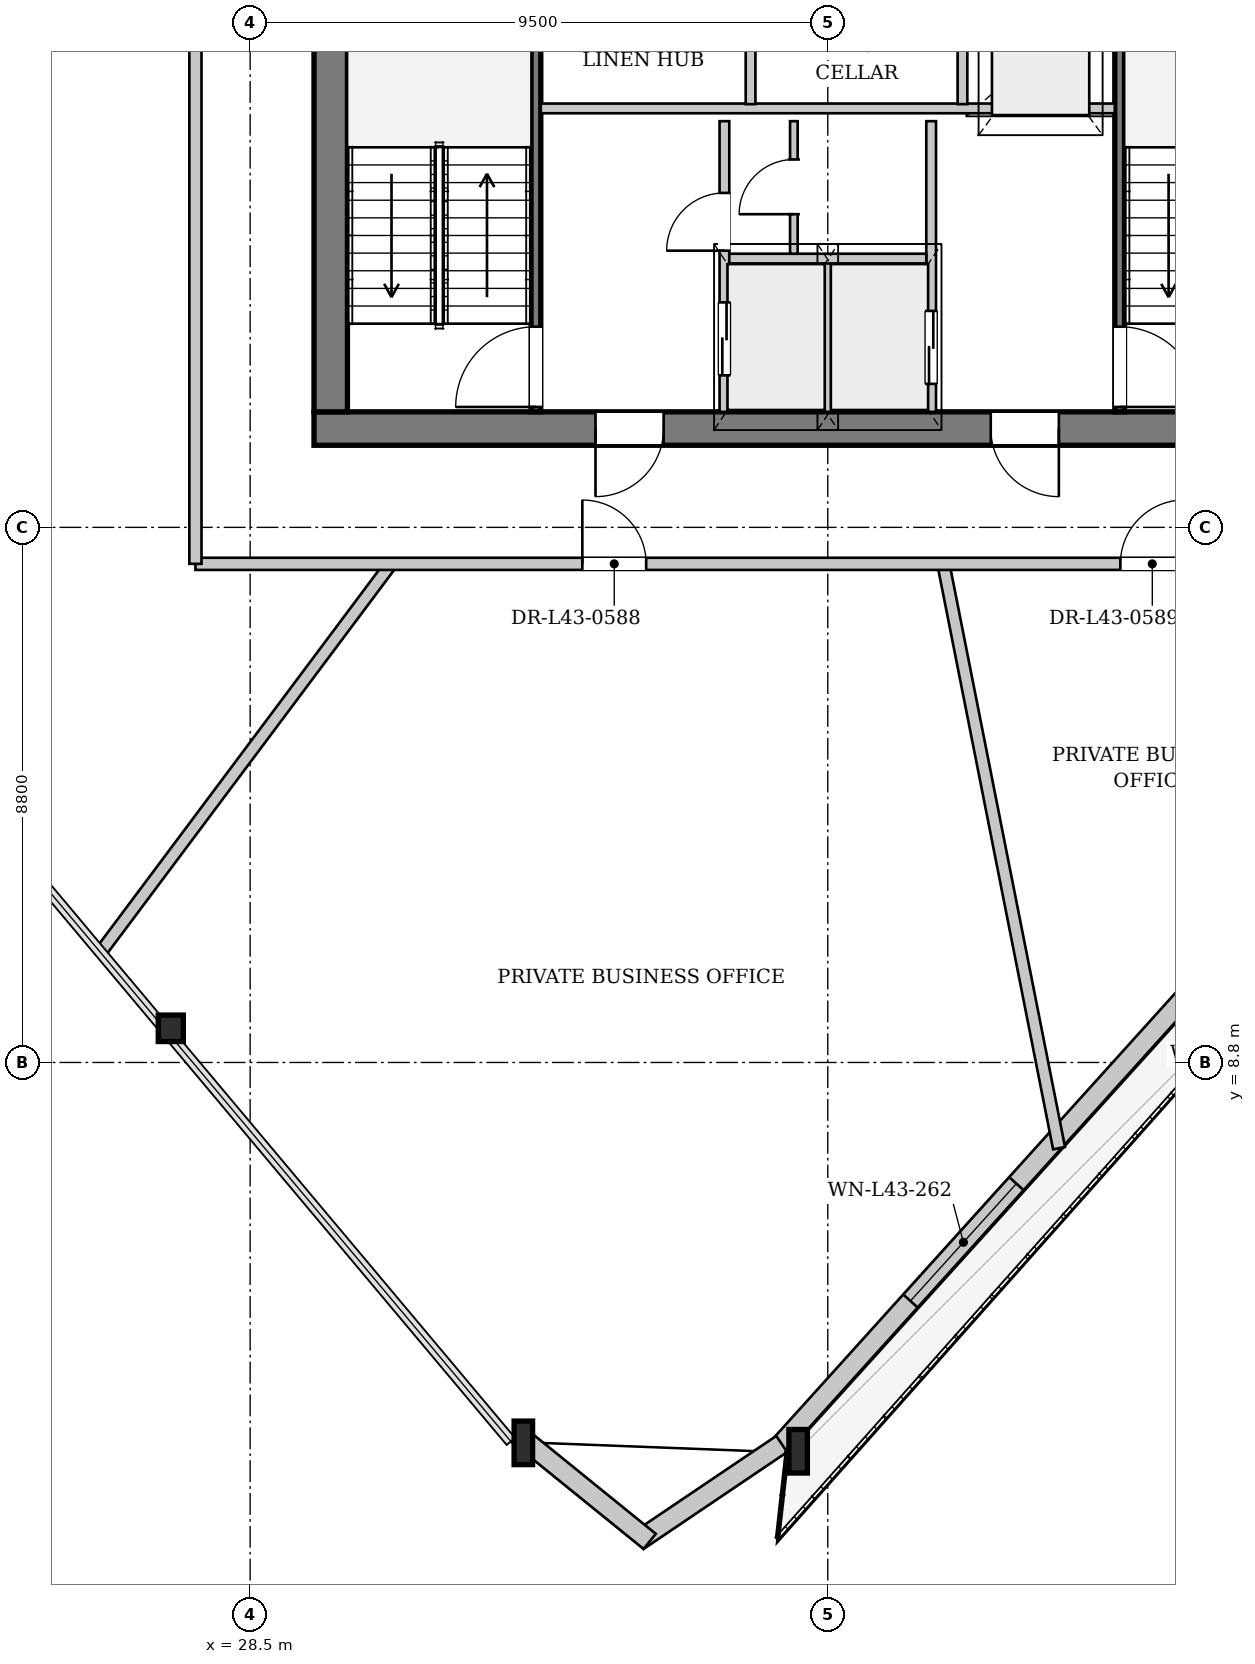
"""IFC4 building model, lengths in metres.
Left out: names, types, materials, properties, quantities, classifications, styles, units other than length and angle.
Written with IfcOpenShell. Run it as: python <this file> out.ifc"""

import sys

from ifc_helpers import new_model, si_unit, direction, frame, frame_2d, origin, origin_2d, place, context, subcontext, project, spatial, rectangle, i_section, extrude, source, transform, mapped, element, fill, save


model = new_model("IFC4")
c1 = context("Model", 3, precision=1e-05, world=origin(), true_north=direction((0.0, 1.0)))
c2 = subcontext(c1, "Body", "Model", "MODEL_VIEW")
j1 = project(units=[si_unit("LENGTHUNIT", "METRE"), si_unit("PLANEANGLEUNIT", "RADIAN")], contexts=[c1])
p1 = place(None, origin())
s1 = spatial("IfcSite", under=j1, at=p1, CompositionType="ELEMENT")
p2 = place(p1, origin())
s2 = spatial("IfcBuilding", under=s1, at=p2, CompositionType="ELEMENT")
p3 = place(p2, frame((0.0, 0.0, 164.35)))
s3 = spatial("IfcBuildingStorey", under=s2, at=p3, CompositionType="ELEMENT", Elevation=164.35)
m1 = source(origin(), c2, "Body", "SweptSolid", [
    extrude(i_section(OverallWidth=0.412, OverallDepth=0.435, WebThickness=0.031, FlangeThickness=0.05, at=origin_2d()), origin(), (0.0, 0.0, 1.0), 3.403),
])
p4 = place(p3, frame((27.031, 9.427, 0.0), z_axis=(0.096057636835, -0.037949581692, 0.994652079702), x_axis=(0.367435364089, 0.930049059575, 0.0)))
e1 = element("IfcColumn", 1, at=p4, inside=s3, PredefinedType="COLUMN", context=c2, shape_type="MappedRepresentation", body=[
    mapped(m1, transform((0.0, 0.0, 0.0), x_axis=(1.0, 0.0, 0.0), y_axis=(0.0, 1.0, 0.0), z_axis=(0.0, 0.0, 1.0), scale=1.0)),
])
m2 = source(origin(), c2, "Body", "SweptSolid", [
    extrude(i_section(OverallWidth=0.304, OverallDepth=0.716, WebThickness=0.021, FlangeThickness=0.04, at=origin_2d()), origin(), (0.0, 0.0, 1.0), 3.41),
])
p5 = place(p3, frame((32.788, 2.568, 0.0), z_axis=(0.12020691326, -0.013602926456, 0.99265565953), x_axis=(0.112444915046, 0.993657959803, 0.0)))
e2 = element("IfcColumn", 2, at=p5, inside=s3, PredefinedType="COLUMN", context=c2, shape_type="MappedRepresentation", body=[
    mapped(m2, transform((0.0, 0.0, 0.0), x_axis=(1.0, 0.0, 0.0), y_axis=(0.0, 1.0, 0.0), z_axis=(0.0, 0.0, 1.0), scale=1.0)),
])
m3 = source(origin(), c2, "Body", "SweptSolid", [
    extrude(i_section(OverallWidth=0.304, OverallDepth=0.716, WebThickness=0.021, FlangeThickness=0.04, at=origin_2d()), origin(), (0.0, 0.0, 1.0), 3.404),
])
p6 = place(p3, frame((37.332, 2.393, 0.0), z_axis=(0.105924766098, 0.007673628959, 0.994344537545), x_axis=(-0.07225478952, 0.997386206738, 0.0)))
e3 = element("IfcColumn", 3, at=p6, inside=s3, PredefinedType="COLUMN", context=c2, shape_type="MappedRepresentation", body=[
    mapped(m3, transform((0.0, 0.0, 0.0), x_axis=(1.0, 0.0, 0.0), y_axis=(0.0, 1.0, 0.0), z_axis=(0.0, 0.0, 1.0), scale=1.0)),
])
p7 = place(p3, frame((52.943, 19.922, 0.0), z_axis=(0.0, 0.0, 1.0), x_axis=(-0.670163184214, -0.742213787614, 0.0)))
e4 = element("IfcWall", 4, at=p7, inside=s3, PredefinedType="SOLIDWALL", context=c2, shape_type="SweptSolid", body=[
    extrude(rectangle(XDim=23.472, YDim=0.32, at=frame_2d((11.736, 0.0))), origin(), (0.0, 0.0, 1.0), 2.722),
])
p8 = place(p7, frame((6.761, 0.0, 0.0)))
e5 = element("IfcOpeningElement", 5, at=p8, cuts=e4, PredefinedType="OPENING", context=c2, shape_type="SweptSolid", body=[
    extrude(rectangle(XDim=1.5, YDim=2.3, at=frame_2d((0.75, 1.15))), frame((0.0, 0.17, 0.0), z_axis=(0.0, -1.0, 0.0), x_axis=(1.0, 0.0, 0.0)), (0.0, 0.0, 1.0), 0.34),
])
p9 = place(p7, frame((17.669, 0.0, 0.252)))
e6 = element("IfcOpeningElement", 6, at=p9, cuts=e4, PredefinedType="OPENING", context=c2, shape_type="SweptSolid", body=[
    extrude(rectangle(XDim=2.6, YDim=2.35, at=frame_2d((1.3, 1.175))), frame((0.0, 0.17, 0.0), z_axis=(0.0, -1.0, 0.0), x_axis=(1.0, 0.0, 0.0)), (0.0, 0.0, 1.0), 0.34),
])
p10 = place(p3, frame((37.242, 2.526, 0.0), z_axis=(0.0, 0.0, 1.0), x_axis=(-0.829005606427, -0.559240292283, 0.0)))
e7 = element("IfcWall", 7, at=p10, inside=s3, PredefinedType="SOLIDWALL", context=c2, shape_type="SweptSolid", body=[
    extrude(rectangle(XDim=2.849, YDim=0.32, at=frame_2d((1.424, 0.0))), origin(), (0.0, 0.0, 1.0), 2.722),
])
p11 = place(p3, frame((35.071, 0.924, 0.0), z_axis=(0.0, 0.0, 1.0), x_axis=(-0.776943093124, 0.629570830048, 0.0)))
e8 = element("IfcWall", 8, at=p11, inside=s3, PredefinedType="SOLIDWALL", context=c2, shape_type="SweptSolid", body=[
    extrude(rectangle(XDim=2.808, YDim=0.32, at=frame_2d((1.404, 0.0))), origin(), (0.0, 0.0, 1.0), 2.722),
])
p12 = place(p3, frame((46.45, 19.225, 0.0), z_axis=(0.0, 0.0, 1.0), x_axis=(-1.0, 0.0, 0.0)))
e9 = element("IfcWall", 9, at=p12, inside=s3, PredefinedType="SHEAR", context=c2, shape_type="SweptSolid", body=[
    extrude(rectangle(XDim=16.9, YDim=0.55, at=frame_2d((8.45, 0.0))), origin(), (0.0, 0.0, 1.0), 3.33),
])
p13 = place(p12, frame((4.65, 0.0, 0.0)))
e10 = element("IfcOpeningElement", 10, at=p13, cuts=e9, PredefinedType="OPENING", context=c2, shape_type="SweptSolid", body=[
    extrude(rectangle(XDim=1.12, YDim=2.25, at=frame_2d((0.56, 1.125))), frame((0.0, 0.285, 0.0), z_axis=(0.0, -1.0, 0.0), x_axis=(1.0, 0.0, 0.0)), (0.0, 0.0, 1.0), 0.57),
])
p14 = place(p12, frame((11.15, 0.0, 0.0)))
e11 = element("IfcOpeningElement", 11, at=p14, cuts=e9, PredefinedType="OPENING", context=c2, shape_type="SweptSolid", body=[
    extrude(rectangle(XDim=1.12, YDim=2.25, at=frame_2d((0.56, 1.125))), frame((0.0, 0.285, 0.0), z_axis=(0.0, -1.0, 0.0), x_axis=(1.0, 0.0, 0.0)), (0.0, 0.0, 1.0), 0.57),
])
p15 = place(p3, frame((29.825, 19.5, 0.0), z_axis=(0.0, 0.0, 1.0), x_axis=(0.0, 1.0, 0.0)))
e12 = element("IfcWall", 12, at=p15, inside=s3, PredefinedType="SHEAR", context=c2, shape_type="SweptSolid", body=[
    extrude(rectangle(XDim=14.2, YDim=0.55, at=frame_2d((7.1, 0.0))), origin(), (0.0, 0.0, 1.0), 3.33),
])
p16 = place(p15, frame((7.42, 0.0, 0.0)))
e13 = element("IfcOpeningElement", 13, at=p16, cuts=e12, PredefinedType="OPENING", context=c2, shape_type="SweptSolid", body=[
    extrude(rectangle(XDim=1.6, YDim=2.2, at=frame_2d((0.8, 1.1))), frame((0.0, 0.285, 0.0), z_axis=(0.0, -1.0, 0.0), x_axis=(1.0, 0.0, 0.0)), (0.0, 0.0, 1.0), 0.57),
])
p17 = place(p3, frame((33.2, 19.5, 0.0), z_axis=(0.0, 0.0, 1.0), x_axis=(0.0, 1.0, 0.0)))
e14 = element("IfcWall", 14, at=p17, inside=s3, PredefinedType="PARTITIONING", context=c2, shape_type="SweptSolid", body=[
    extrude(rectangle(XDim=7.46, YDim=0.16, at=frame_2d((3.73, 0.0))), origin(), (0.0, 0.0, 1.0), 3.33),
])
p18 = place(p17, frame((0.08, 0.0, 0.0)))
e15 = element("IfcOpeningElement", 15, at=p18, cuts=e14, PredefinedType="OPENING", context=c2, shape_type="SweptSolid", body=[
    extrude(rectangle(XDim=1.32, YDim=2.2, at=frame_2d((0.66, 1.1))), frame((0.0, 0.09, 0.0), z_axis=(0.0, -1.0, 0.0), x_axis=(1.0, 0.0, 0.0)), (0.0, 0.0, 1.0), 0.18),
])
p19 = place(p3, frame((42.8, 26.96, 0.0), z_axis=(0.0, 0.0, 1.0), x_axis=(0.0, -1.0, 0.0)))
e16 = element("IfcWall", 16, at=p19, inside=s3, PredefinedType="PARTITIONING", context=c2, shape_type="SweptSolid", body=[
    extrude(rectangle(XDim=7.46, YDim=0.16, at=frame_2d((3.73, 0.0))), origin(), (0.0, 0.0, 1.0), 3.33),
])
p20 = place(p19, frame((6.06, 0.0, 0.0)))
e17 = element("IfcOpeningElement", 17, at=p20, cuts=e16, PredefinedType="OPENING", context=c2, shape_type="SweptSolid", body=[
    extrude(rectangle(XDim=1.32, YDim=2.2, at=frame_2d((0.66, 1.1))), frame((0.0, 0.09, 0.0), z_axis=(0.0, -1.0, 0.0), x_axis=(1.0, 0.0, 0.0)), (0.0, 0.0, 1.0), 0.18),
])
p21 = place(p3, frame((36.3, 19.5, 0.0), z_axis=(0.0, 0.0, 1.0), x_axis=(0.0, 1.0, 0.0)))
e18 = element("IfcWall", 18, at=p21, inside=s3, PredefinedType="PARTITIONING", context=c2, shape_type="SweptSolid", body=[
    extrude(rectangle(XDim=4.78, YDim=0.16, at=frame_2d((2.39, 0.0))), origin(), (0.0, 0.0, 1.0), 3.33),
])
p22 = place(p21, frame((0.6, 0.0, 0.0)))
e19 = element("IfcOpeningElement", 19, at=p22, cuts=e18, PredefinedType="OPENING", context=c2, shape_type="SweptSolid", body=[
    extrude(rectangle(XDim=1.2, YDim=2.2, at=frame_2d((0.6, 1.1))), frame((0.0, 0.09, 0.0), z_axis=(0.0, -1.0, 0.0), x_axis=(1.0, 0.0, 0.0)), (0.0, 0.0, 1.0), 0.18),
])
p23 = place(p21, frame((2.65, 0.0, 0.0)))
e20 = element("IfcOpeningElement", 20, at=p23, cuts=e18, PredefinedType="OPENING", context=c2, shape_type="SweptSolid", body=[
    extrude(rectangle(XDim=0.95, YDim=2.1, at=frame_2d((0.475, 1.05))), frame((0.0, 0.09, 0.0), z_axis=(0.0, -1.0, 0.0), x_axis=(1.0, 0.0, 0.0)), (0.0, 0.0, 1.0), 0.18),
])
p24 = place(p3, frame((39.7, 24.28, 0.0), z_axis=(0.0, 0.0, 1.0), x_axis=(0.0, -1.0, 0.0)))
e21 = element("IfcWall", 21, at=p24, inside=s3, PredefinedType="PARTITIONING", context=c2, shape_type="SweptSolid", body=[
    extrude(rectangle(XDim=4.78, YDim=0.16, at=frame_2d((2.39, 0.0))), origin(), (0.0, 0.0, 1.0), 3.33),
])
p25 = place(p24, frame((3.12, 0.0, 0.0)))
e22 = element("IfcOpeningElement", 22, at=p25, cuts=e21, PredefinedType="OPENING", context=c2, shape_type="SweptSolid", body=[
    extrude(rectangle(XDim=1.2, YDim=2.2, at=frame_2d((0.6, 1.1))), frame((0.0, 0.09, 0.0), z_axis=(0.0, -1.0, 0.0), x_axis=(1.0, 0.0, 0.0)), (0.0, 0.0, 1.0), 0.18),
])
p26 = place(p3, frame((38.0, 19.5, 0.0), z_axis=(0.0, 0.0, 1.0), x_axis=(0.0, 1.0, 0.0)))
e23 = element("IfcWall", 23, at=p26, inside=s3, PredefinedType="PARTITIONING", context=c2, shape_type="SweptSolid", body=[
    extrude(rectangle(XDim=2.46, YDim=0.125, at=frame_2d((1.23, 0.0))), origin(), (0.0, 0.0, 1.0), 3.33),
])
p27 = place(p3, frame((36.38, 22.02, 0.0), z_axis=(0.0, 0.0, 1.0), x_axis=(1.0, 0.0, 0.0)))
e24 = element("IfcWall", 24, at=p27, inside=s3, PredefinedType="PARTITIONING", context=c2, shape_type="SweptSolid", body=[
    extrude(rectangle(XDim=3.24, YDim=0.16, at=frame_2d((1.62, 0.0))), origin(), (0.0, 0.0, 1.0), 3.33),
])
p28 = place(p3, frame((33.28, 24.49, 0.0), z_axis=(0.0, 0.0, 1.0), x_axis=(1.0, 0.0, 0.0)))
e25 = element("IfcWall", 25, at=p28, inside=s3, PredefinedType="PARTITIONING", context=c2, shape_type="SweptSolid", body=[
    extrude(rectangle(XDim=9.44, YDim=0.16, at=frame_2d((4.72, 0.0))), origin(), (0.0, 0.0, 1.0), 3.33),
])
p29 = place(p3, frame((37.442, 22.1, 0.0), z_axis=(0.0, 0.0, 1.0), x_axis=(0.0, 1.0, 0.0)))
e26 = element("IfcWall", 26, at=p29, inside=s3, PredefinedType="PARTITIONING", context=c2, shape_type="SweptSolid", body=[
    extrude(rectangle(XDim=2.18, YDim=0.125, at=frame_2d((1.09, 0.0))), origin(), (0.0, 0.0, 1.0), 3.33),
])
p30 = place(p29, frame((0.65, 0.0, 0.0)))
e27 = element("IfcOpeningElement", 27, at=p30, cuts=e26, PredefinedType="OPENING", context=c2, shape_type="SweptSolid", body=[
    extrude(rectangle(XDim=0.9, YDim=2.1, at=frame_2d((0.45, 1.05))), frame((0.0, 0.073, 0.0), z_axis=(0.0, -1.0, 0.0), x_axis=(1.0, 0.0, 0.0)), (0.0, 0.0, 1.0), 0.145),
])
for number, where, z_axis, x_axis in (
    (28, (36.73, 24.56, 0.0), (0.0, 0.0, 1.0), (0.0, 1.0, 0.0)),
    (29, (40.215, 24.56, 0.0), (0.0, 0.0, 1.0), (0.0, 1.0, 0.0)),
):
    element("IfcWall", number, at=place(p3, frame(where, z_axis=z_axis, x_axis=x_axis)), inside=s3, PredefinedType="PARTITIONING", context=c2, shape_type="SweptSolid", body=[
        extrude(rectangle(XDim=2.31, YDim=0.16, at=frame_2d((1.155, 0.0))), origin(), (0.0, 0.0, 1.0), 3.33),
    ])
p31 = place(p3, frame((30.818, 17.0, 0.0), z_axis=(0.0, 0.0, 1.0), x_axis=(-0.599036438664, -0.80072176513, 0.0)))
e30 = element("IfcWall", 30, at=p31, inside=s3, PredefinedType="PARTITIONING", context=c2, shape_type="SweptSolid", body=[
    extrude(rectangle(XDim=7.949, YDim=0.2, at=frame_2d((3.975, 0.0))), origin(), (0.0, 0.0, 1.0), 3.33),
])
p32 = place(p3, frame((39.901, 17.0, 0.0), z_axis=(0.0, 0.0, 1.0), x_axis=(0.194222602979, -0.98095748149, 0.0)))
e31 = element("IfcWall", 31, at=p32, inside=s3, PredefinedType="PARTITIONING", context=c2, shape_type="SweptSolid", body=[
    extrude(rectangle(XDim=9.796, YDim=0.2, at=frame_2d((4.898, 0.0))), origin(), (0.0, 0.0, 1.0), 3.33),
])
p33 = place(p3, frame((27.6, 17.0, 0.0), z_axis=(0.0, 0.0, 1.0), x_axis=(1.0, 0.0, 0.0)))
e32 = element("IfcWall", 32, at=p33, inside=s3, PredefinedType="PARTITIONING", context=c2, shape_type="SweptSolid", body=[
    extrude(rectangle(XDim=20.8, YDim=0.2, at=frame_2d((10.4, 0.0))), origin(), (0.0, 0.0, 1.0), 3.33),
])
p34 = place(p33, frame((6.363, 0.0, 0.0)))
e33 = element("IfcOpeningElement", 33, at=p34, cuts=e32, PredefinedType="OPENING", context=c2, shape_type="SweptSolid", body=[
    extrude(rectangle(XDim=1.05, YDim=2.2, at=frame_2d((0.525, 1.1))), frame((0.0, 0.11, 0.0), z_axis=(0.0, -1.0, 0.0), x_axis=(1.0, 0.0, 0.0)), (0.0, 0.0, 1.0), 0.22),
])
p35 = place(p33, frame((15.212, 0.0, 0.0)))
e34 = element("IfcOpeningElement", 34, at=p35, cuts=e32, PredefinedType="OPENING", context=c2, shape_type="SweptSolid", body=[
    extrude(rectangle(XDim=1.05, YDim=2.2, at=frame_2d((0.525, 1.1))), frame((0.0, 0.11, 0.0), z_axis=(0.0, -1.0, 0.0), x_axis=(1.0, 0.0, 0.0)), (0.0, 0.0, 1.0), 0.22),
])
p36 = place(p3, frame((27.6, 17.0, 0.0), z_axis=(0.0, 0.0, 1.0), x_axis=(0.0, 1.0, 0.0)))
e35 = element("IfcWall", 35, at=p36, inside=s3, PredefinedType="PARTITIONING", context=c2, shape_type="SweptSolid", body=[
    extrude(rectangle(XDim=19.2, YDim=0.2, at=frame_2d((9.6, 0.0))), origin(), (0.0, 0.0, 1.0), 3.33),
])
m4 = source(origin(), c2, "Body", "SweptSolid", [
    extrude(rectangle(XDim=2.6, YDim=2.35, at=frame_2d((1.3, 1.175))), frame((0.0, 0.03, 0.0), z_axis=(0.0, -1.0, 0.0), x_axis=(1.0, 0.0, 0.0)), (0.0, 0.0, 1.0), 0.06),
])
p37 = place(p9, origin())
e36 = element("IfcWindow", 36, at=p37, inside=s3, PartitioningType="SINGLE_PANEL", PredefinedType="WINDOW", context=c2, shape_type="MappedRepresentation", body=[
    mapped(m4, transform((0.0, 0.0, 0.0), x_axis=(1.0, 0.0, 0.0), y_axis=(0.0, 1.0, 0.0), z_axis=(0.0, 0.0, 1.0), scale=1.0)),
])
fill(e6, e36)
m5 = source(origin(), c2, "Body", "SweptSolid", [
    extrude(rectangle(XDim=1.12, YDim=2.25, at=frame_2d((0.56, 1.125))), frame((0.0, 0.025, 0.0), z_axis=(0.0, -1.0, 0.0), x_axis=(1.0, 0.0, 0.0)), (0.0, 0.0, 1.0), 0.05),
])
p38 = place(p13, origin())
e37 = element("IfcDoor", 37, at=p38, inside=s3, OperationType="SINGLE_SWING_LEFT", PredefinedType="DOOR", context=c2, shape_type="MappedRepresentation", body=[
    mapped(m5, transform((0.0, 0.0, 0.0), x_axis=(1.0, 0.0, 0.0), y_axis=(0.0, 1.0, 0.0), z_axis=(0.0, 0.0, 1.0), scale=1.0)),
])
fill(e10, e37)
p39 = place(p14, origin())
e38 = element("IfcDoor", 38, at=p39, inside=s3, OperationType="SINGLE_SWING_RIGHT", PredefinedType="DOOR", context=c2, shape_type="MappedRepresentation", body=[
    mapped(m5, transform((0.0, 0.0, 0.0), x_axis=(1.0, 0.0, 0.0), y_axis=(0.0, 1.0, 0.0), z_axis=(0.0, 0.0, 1.0), scale=1.0)),
])
fill(e11, e38)
m6 = source(origin(), c2, "Body", "SweptSolid", [
    extrude(rectangle(XDim=1.32, YDim=2.2, at=frame_2d((0.66, 1.1))), frame((0.0, 0.025, 0.0), z_axis=(0.0, -1.0, 0.0), x_axis=(1.0, 0.0, 0.0)), (0.0, 0.0, 1.0), 0.05),
])
p40 = place(p18, origin())
e39 = element("IfcDoor", 39, at=p40, inside=s3, OperationType="SINGLE_SWING_LEFT", PredefinedType="DOOR", context=c2, shape_type="MappedRepresentation", body=[
    mapped(m6, transform((0.0, 0.0, 0.0), x_axis=(1.0, 0.0, 0.0), y_axis=(0.0, 1.0, 0.0), z_axis=(0.0, 0.0, 1.0), scale=1.0)),
])
fill(e15, e39)
p41 = place(p20, origin())
e40 = element("IfcDoor", 40, at=p41, inside=s3, OperationType="SINGLE_SWING_RIGHT", PredefinedType="DOOR", context=c2, shape_type="MappedRepresentation", body=[
    mapped(m6, transform((0.0, 0.0, 0.0), x_axis=(1.0, 0.0, 0.0), y_axis=(0.0, 1.0, 0.0), z_axis=(0.0, 0.0, 1.0), scale=1.0)),
])
fill(e17, e40)
m7 = source(origin(), c2, "Body", "SweptSolid", [
    extrude(rectangle(XDim=1.2, YDim=2.2, at=frame_2d((0.6, 1.1))), frame((0.0, 0.025, 0.0), z_axis=(0.0, -1.0, 0.0), x_axis=(1.0, 0.0, 0.0)), (0.0, 0.0, 1.0), 0.05),
])
p42 = place(p22, origin())
e41 = element("IfcDoor", 41, at=p42, inside=s3, OperationType="DOUBLE_DOOR_SLIDING", PredefinedType="DOOR", context=c2, shape_type="MappedRepresentation", body=[
    mapped(m7, transform((0.0, 0.0, 0.0), x_axis=(1.0, 0.0, 0.0), y_axis=(0.0, 1.0, 0.0), z_axis=(0.0, 0.0, 1.0), scale=1.0)),
])
fill(e19, e41)
m8 = source(origin(), c2, "Body", "SweptSolid", [
    extrude(rectangle(XDim=0.95, YDim=2.1, at=frame_2d((0.475, 1.05))), frame((0.0, 0.025, 0.0), z_axis=(0.0, -1.0, 0.0), x_axis=(1.0, 0.0, 0.0)), (0.0, 0.0, 1.0), 0.05),
])
p43 = place(p23, origin())
e42 = element("IfcDoor", 42, at=p43, inside=s3, OperationType="SINGLE_SWING_LEFT", PredefinedType="DOOR", context=c2, shape_type="MappedRepresentation", body=[
    mapped(m8, transform((0.0, 0.0, 0.0), x_axis=(1.0, 0.0, 0.0), y_axis=(0.0, 1.0, 0.0), z_axis=(0.0, 0.0, 1.0), scale=1.0)),
])
fill(e20, e42)
m9 = source(origin(), c2, "Body", "SweptSolid", [
    extrude(rectangle(XDim=0.9, YDim=2.1, at=frame_2d((0.45, 1.05))), frame((0.0, 0.025, 0.0), z_axis=(0.0, -1.0, 0.0), x_axis=(1.0, 0.0, 0.0)), (0.0, 0.0, 1.0), 0.05),
])
p44 = place(p30, origin())
e43 = element("IfcDoor", 43, at=p44, inside=s3, OperationType="SINGLE_SWING_LEFT", PredefinedType="DOOR", context=c2, shape_type="MappedRepresentation", body=[
    mapped(m9, transform((0.0, 0.0, 0.0), x_axis=(1.0, 0.0, 0.0), y_axis=(0.0, 1.0, 0.0), z_axis=(0.0, 0.0, 1.0), scale=1.0)),
])
fill(e27, e43)
p45 = place(p25, origin())
e44 = element("IfcDoor", 44, at=p45, inside=s3, OperationType="DOUBLE_DOOR_SLIDING", PredefinedType="DOOR", context=c2, shape_type="MappedRepresentation", body=[
    mapped(m7, transform((0.0, 0.0, 0.0), x_axis=(1.0, 0.0, 0.0), y_axis=(0.0, 1.0, 0.0), z_axis=(0.0, 0.0, 1.0), scale=1.0)),
])
fill(e22, e44)
m10 = source(origin(), c2, "Body", "SweptSolid", [
    extrude(rectangle(XDim=1.05, YDim=2.2, at=frame_2d((0.525, 1.1))), frame((0.0, 0.025, 0.0), z_axis=(0.0, -1.0, 0.0), x_axis=(1.0, 0.0, 0.0)), (0.0, 0.0, 1.0), 0.05),
])
p46 = place(p34, origin())
e45 = element("IfcDoor", 45, at=p46, inside=s3, OperationType="SINGLE_SWING_LEFT", PredefinedType="DOOR", context=c2, shape_type="MappedRepresentation", body=[
    mapped(m10, transform((0.0, 0.0, 0.0), x_axis=(1.0, 0.0, 0.0), y_axis=(0.0, 1.0, 0.0), z_axis=(0.0, 0.0, 1.0), scale=1.0)),
])
fill(e33, e45)
p47 = place(p35, origin())
e46 = element("IfcDoor", 46, at=p47, inside=s3, OperationType="SINGLE_SWING_RIGHT", PredefinedType="DOOR", context=c2, shape_type="MappedRepresentation", body=[
    mapped(m10, transform((0.0, 0.0, 0.0), x_axis=(1.0, 0.0, 0.0), y_axis=(0.0, 1.0, 0.0), z_axis=(0.0, 0.0, 1.0), scale=1.0)),
])
fill(e34, e46)
save(model, sys.argv[1])
